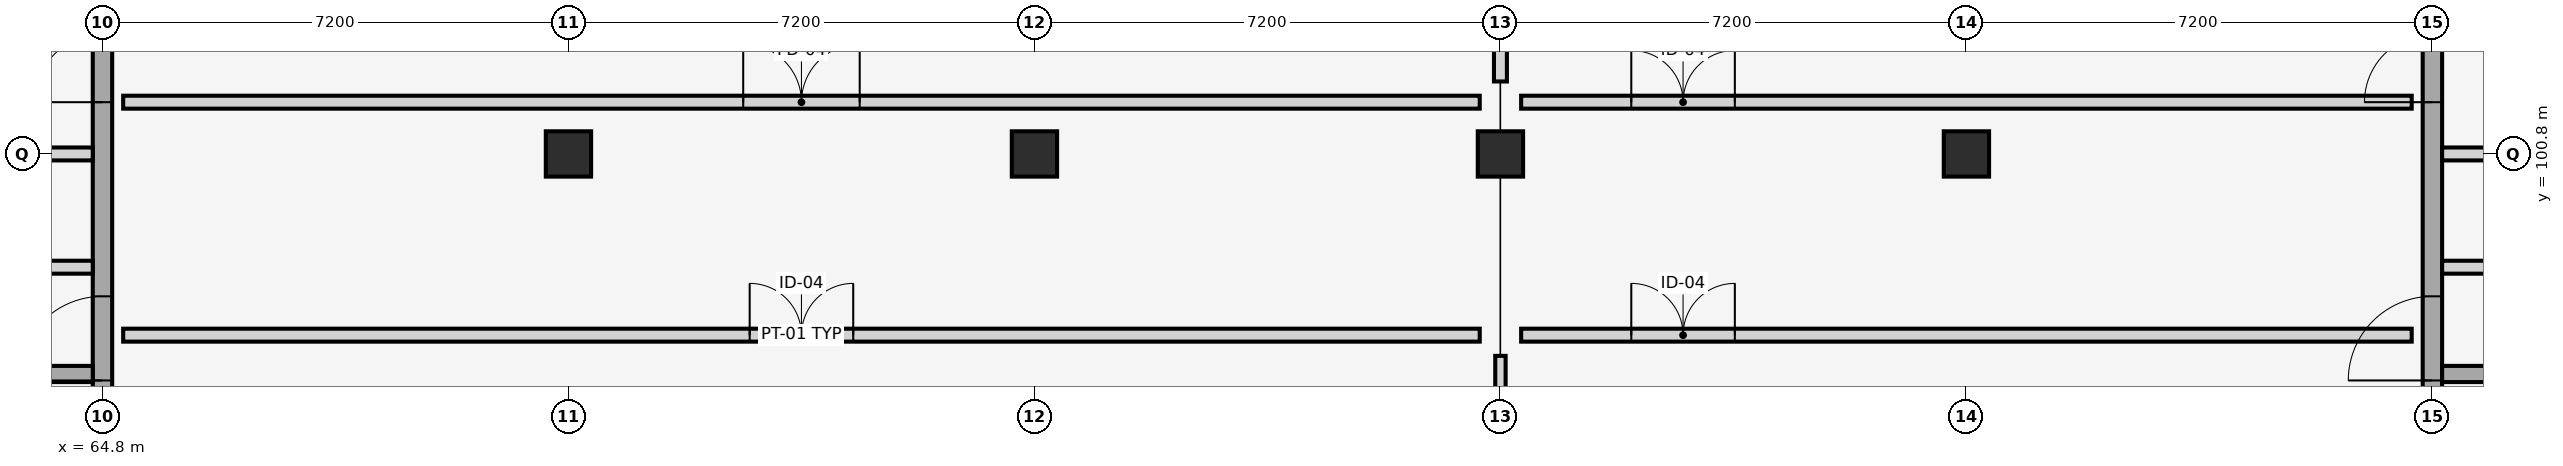
"""IFC4 building model, lengths in metres.
Left out: names, types, materials, properties, quantities, classifications, styles, units other than length and angle.
Written with IfcOpenShell. Run it as: python <this file> out.ifc"""

import sys

from ifc_helpers import new_model, si_unit, direction, frame, frame_2d, origin, origin_2d, place, context, subcontext, project, spatial, rectangle, extrude, element, fill, save


model = new_model("IFC4")
c1 = context("Model", 3, precision=1e-05, world=origin(), true_north=direction((0.0, 1.0)))
c2 = subcontext(c1, "Body", "Model", "MODEL_VIEW")
j1 = project(units=[si_unit("LENGTHUNIT", "METRE"), si_unit("PLANEANGLEUNIT", "RADIAN")], contexts=[c1])
p1 = place(None, origin())
s1 = spatial("IfcSite", under=j1, at=p1, CompositionType="ELEMENT")
p2 = place(p1, origin())
s2 = spatial("IfcBuilding", under=s1, at=p2, CompositionType="ELEMENT")
p3 = place(p2, frame((0.0, 0.0, -4.5)))
s3 = spatial("IfcBuildingStorey", under=s2, at=p3, CompositionType="ELEMENT", Elevation=-4.5)
for number, where, z_axis, x_axis in (
    (1, (72.0, 100.8, -0.45), (0.0, 0.0, 1.0), (1.0, 0.0, 0.0)),
    (2, (79.2, 100.8, -0.45), (0.0, 0.0, 1.0), (0.0, 1.0, 0.0)),
    (3, (86.4, 100.8, -0.45), (0.0, 0.0, 1.0), (1.0, 0.0, 0.0)),
    (4, (93.6, 100.8, -0.45), (0.0, 0.0, 1.0), (0.0, 1.0, 0.0)),
):
    element("IfcColumn", number, at=place(p3, frame(where, z_axis=z_axis, x_axis=x_axis)), inside=s3, PredefinedType="COLUMN", context=c2, shape_type="SweptSolid", body=[
        extrude(rectangle(XDim=0.7, YDim=0.7, at=origin_2d()), origin(), (0.0, 0.0, 1.0), 4.95),
    ])
p4 = place(p3, frame((64.8, 93.75, 0.0), z_axis=(0.0, 0.0, 1.0), x_axis=(0.0, 1.0, 0.0)))
e5 = element("IfcWall", 5, at=p4, inside=s3, PredefinedType="SHEAR", context=c2, shape_type="SweptSolid", body=[
    extrude(rectangle(XDim=14.1, YDim=0.3, at=frame_2d((7.05, 0.0))), origin(), (0.0, 0.0, 1.0), 4.25),
])
p5 = place(p4, frame((3.55, 0.0, 0.0)))
e6 = element("IfcOpeningElement", 6, at=p5, cuts=e5, PredefinedType="OPENING", context=c2, shape_type="SweptSolid", body=[
    extrude(rectangle(XDim=1.3, YDim=2.2, at=frame_2d((0.65, 1.1))), frame((0.0, 0.16, 0.0), z_axis=(0.0, -1.0, 0.0), x_axis=(1.0, 0.0, 0.0)), (0.0, 0.0, 1.0), 0.32),
])
p6 = place(p4, frame((7.85, 0.0, 0.0)))
e7 = element("IfcOpeningElement", 7, at=p6, cuts=e5, PredefinedType="OPENING", context=c2, shape_type="SweptSolid", body=[
    extrude(rectangle(XDim=1.05, YDim=2.15, at=frame_2d((0.525, 1.075))), frame((0.0, 0.16, 0.0), z_axis=(0.0, -1.0, 0.0), x_axis=(1.0, 0.0, 0.0)), (0.0, 0.0, 1.0), 0.32),
])
p7 = place(p4, frame((10.55, 0.0, 0.0)))
e8 = element("IfcOpeningElement", 8, at=p7, cuts=e5, PredefinedType="OPENING", context=c2, shape_type="SweptSolid", body=[
    extrude(rectangle(XDim=1.0, YDim=2.15, at=frame_2d((0.5, 1.075))), frame((0.0, 0.16, 0.0), z_axis=(0.0, -1.0, 0.0), x_axis=(1.0, 0.0, 0.0)), (0.0, 0.0, 1.0), 0.32),
])
p8 = place(p3, frame((61.1, 99.05, 0.0), z_axis=(0.0, 0.0, 1.0), x_axis=(1.0, 0.0, 0.0)))
e9 = element("IfcWall", 9, at=p8, inside=s3, PredefinedType="PLUMBINGWALL", context=c2, shape_type="SweptSolid", body=[
    extrude(rectangle(XDim=3.55, YDim=0.2, at=frame_2d((1.775, 0.0))), origin(), (0.0, 0.0, 1.0), 3.67),
])
p9 = place(p8, frame((0.9, 0.0, 0.0)))
e10 = element("IfcOpeningElement", 10, at=p9, cuts=e9, PredefinedType="OPENING", context=c2, shape_type="SweptSolid", body=[
    extrude(rectangle(XDim=0.85, YDim=2.05, at=frame_2d((0.425, 1.025))), frame((0.0, 0.11, 0.0), z_axis=(0.0, -1.0, 0.0), x_axis=(1.0, 0.0, 0.0)), (0.0, 0.0, 1.0), 0.22),
])
p10 = place(p3, frame((61.275, 97.4, 0.0), z_axis=(0.0, 0.0, 1.0), x_axis=(1.0, 0.0, 0.0)))
e11 = element("IfcWall", 11, at=p10, inside=s3, PredefinedType="SHEAR", context=c2, shape_type="SweptSolid", body=[
    extrude(rectangle(XDim=3.375, YDim=0.25, at=frame_2d((1.688, 0.0))), origin(), (0.0, 0.0, 1.0), 4.25),
])
p11 = place(p3, frame((61.1, 100.8, 0.0), z_axis=(0.0, 0.0, 1.0), x_axis=(1.0, 0.0, 0.0)))
e12 = element("IfcWall", 12, at=p11, inside=s3, PredefinedType="PLUMBINGWALL", context=c2, shape_type="SweptSolid", body=[
    extrude(rectangle(XDim=3.55, YDim=0.2, at=frame_2d((1.775, 0.0))), origin(), (0.0, 0.0, 1.0), 3.67),
])
p12 = place(p3, frame((100.8, 93.75, 0.0), z_axis=(0.0, 0.0, 1.0), x_axis=(0.0, 1.0, 0.0)))
e13 = element("IfcWall", 13, at=p12, inside=s3, PredefinedType="SHEAR", context=c2, shape_type="SweptSolid", body=[
    extrude(rectangle(XDim=14.1, YDim=0.3, at=frame_2d((7.05, 0.0))), origin(), (0.0, 0.0, 1.0), 4.25),
])
p13 = place(p12, frame((3.55, 0.0, 0.0)))
e14 = element("IfcOpeningElement", 14, at=p13, cuts=e13, PredefinedType="OPENING", context=c2, shape_type="SweptSolid", body=[
    extrude(rectangle(XDim=1.3, YDim=2.2, at=frame_2d((0.65, 1.1))), frame((0.0, 0.16, 0.0), z_axis=(0.0, -1.0, 0.0), x_axis=(1.0, 0.0, 0.0)), (0.0, 0.0, 1.0), 0.32),
])
p14 = place(p12, frame((7.85, 0.0, 0.0)))
e15 = element("IfcOpeningElement", 15, at=p14, cuts=e13, PredefinedType="OPENING", context=c2, shape_type="SweptSolid", body=[
    extrude(rectangle(XDim=1.05, YDim=2.15, at=frame_2d((0.525, 1.075))), frame((0.0, 0.16, 0.0), z_axis=(0.0, -1.0, 0.0), x_axis=(1.0, 0.0, 0.0)), (0.0, 0.0, 1.0), 0.32),
])
p15 = place(p12, frame((10.55, 0.0, 0.0)))
e16 = element("IfcOpeningElement", 16, at=p15, cuts=e13, PredefinedType="OPENING", context=c2, shape_type="SweptSolid", body=[
    extrude(rectangle(XDim=1.0, YDim=2.15, at=frame_2d((0.5, 1.075))), frame((0.0, 0.16, 0.0), z_axis=(0.0, -1.0, 0.0), x_axis=(1.0, 0.0, 0.0)), (0.0, 0.0, 1.0), 0.32),
])
p16 = place(p3, frame((100.95, 99.05, 0.0), z_axis=(0.0, 0.0, 1.0), x_axis=(1.0, 0.0, 0.0)))
e17 = element("IfcWall", 17, at=p16, inside=s3, PredefinedType="PLUMBINGWALL", context=c2, shape_type="SweptSolid", body=[
    extrude(rectangle(XDim=3.55, YDim=0.2, at=frame_2d((1.775, 0.0))), origin(), (0.0, 0.0, 1.0), 3.67),
])
p17 = place(p16, frame((0.9, 0.0, 0.0)))
e18 = element("IfcOpeningElement", 18, at=p17, cuts=e17, PredefinedType="OPENING", context=c2, shape_type="SweptSolid", body=[
    extrude(rectangle(XDim=0.85, YDim=2.05, at=frame_2d((0.425, 1.025))), frame((0.0, 0.11, 0.0), z_axis=(0.0, -1.0, 0.0), x_axis=(1.0, 0.0, 0.0)), (0.0, 0.0, 1.0), 0.22),
])
p18 = place(p3, frame((100.95, 97.4, 0.0), z_axis=(0.0, 0.0, 1.0), x_axis=(1.0, 0.0, 0.0)))
e19 = element("IfcWall", 19, at=p18, inside=s3, PredefinedType="SHEAR", context=c2, shape_type="SweptSolid", body=[
    extrude(rectangle(XDim=3.375, YDim=0.25, at=frame_2d((1.688, 0.0))), origin(), (0.0, 0.0, 1.0), 4.25),
])
p19 = place(p3, frame((100.95, 100.8, 0.0), z_axis=(0.0, 0.0, 1.0), x_axis=(1.0, 0.0, 0.0)))
e20 = element("IfcWall", 20, at=p19, inside=s3, PredefinedType="PLUMBINGWALL", context=c2, shape_type="SweptSolid", body=[
    extrude(rectangle(XDim=3.55, YDim=0.2, at=frame_2d((1.775, 0.0))), origin(), (0.0, 0.0, 1.0), 3.67),
])
p20 = place(p3, frame((65.12, 98.0, 0.0), z_axis=(0.0, 0.0, 1.0), x_axis=(1.0, 0.0, 0.0)))
e21 = element("IfcWall", 21, at=p20, inside=s3, PredefinedType="PARTITIONING", context=c2, shape_type="SweptSolid", body=[
    extrude(rectangle(XDim=20.96, YDim=0.2, at=frame_2d((10.48, 0.0))), origin(), (0.0, 0.0, 1.0), 3.45),
])
p21 = place(p20, frame((9.68, 0.0, 0.0)))
e22 = element("IfcOpeningElement", 22, at=p21, cuts=e21, PredefinedType="OPENING", context=c2, shape_type="SweptSolid", body=[
    extrude(rectangle(XDim=1.6, YDim=2.35, at=frame_2d((0.8, 1.175))), frame((0.0, 0.11, 0.0), z_axis=(0.0, -1.0, 0.0), x_axis=(1.0, 0.0, 0.0)), (0.0, 0.0, 1.0), 0.22),
])
p22 = place(p3, frame((86.72, 98.0, 0.0), z_axis=(0.0, 0.0, 1.0), x_axis=(1.0, 0.0, 0.0)))
e23 = element("IfcWall", 23, at=p22, inside=s3, PredefinedType="PARTITIONING", context=c2, shape_type="SweptSolid", body=[
    extrude(rectangle(XDim=13.76, YDim=0.2, at=frame_2d((6.88, 0.0))), origin(), (0.0, 0.0, 1.0), 3.45),
])
p23 = place(p22, frame((1.702, 0.0, 0.0)))
e24 = element("IfcOpeningElement", 24, at=p23, cuts=e23, PredefinedType="OPENING", context=c2, shape_type="SweptSolid", body=[
    extrude(rectangle(XDim=1.6, YDim=2.35, at=frame_2d((0.8, 1.175))), frame((0.0, 0.11, 0.0), z_axis=(0.0, -1.0, 0.0), x_axis=(1.0, 0.0, 0.0)), (0.0, 0.0, 1.0), 0.22),
])
p24 = place(p3, frame((65.12, 101.6, 0.0), z_axis=(0.0, 0.0, 1.0), x_axis=(1.0, 0.0, 0.0)))
e25 = element("IfcWall", 25, at=p24, inside=s3, PredefinedType="PARTITIONING", context=c2, shape_type="SweptSolid", body=[
    extrude(rectangle(XDim=20.96, YDim=0.2, at=frame_2d((10.48, 0.0))), origin(), (0.0, 0.0, 1.0), 3.45),
])
p25 = place(p24, frame((9.58, 0.0, 0.0)))
e26 = element("IfcOpeningElement", 26, at=p25, cuts=e25, PredefinedType="OPENING", context=c2, shape_type="SweptSolid", body=[
    extrude(rectangle(XDim=1.8, YDim=2.4, at=frame_2d((0.9, 1.2))), frame((0.0, 0.11, 0.0), z_axis=(0.0, -1.0, 0.0), x_axis=(1.0, 0.0, 0.0)), (0.0, 0.0, 1.0), 0.22),
])
p26 = place(p3, frame((86.72, 101.6, 0.0), z_axis=(0.0, 0.0, 1.0), x_axis=(1.0, 0.0, 0.0)))
e27 = element("IfcWall", 27, at=p26, inside=s3, PredefinedType="PARTITIONING", context=c2, shape_type="SweptSolid", body=[
    extrude(rectangle(XDim=13.76, YDim=0.2, at=frame_2d((6.88, 0.0))), origin(), (0.0, 0.0, 1.0), 3.45),
])
p27 = place(p26, frame((1.702, 0.0, 0.0)))
e28 = element("IfcOpeningElement", 28, at=p27, cuts=e27, PredefinedType="OPENING", context=c2, shape_type="SweptSolid", body=[
    extrude(rectangle(XDim=1.6, YDim=2.35, at=frame_2d((0.8, 1.175))), frame((0.0, 0.11, 0.0), z_axis=(0.0, -1.0, 0.0), x_axis=(1.0, 0.0, 0.0)), (0.0, 0.0, 1.0), 0.22),
])
p28 = place(p3, frame((86.4, 86.72, 0.0), z_axis=(0.0, 0.0, 1.0), x_axis=(0.0, 1.0, 0.0)))
e29 = element("IfcWall", 29, at=p28, inside=s3, PredefinedType="PARTITIONING", context=c2, shape_type="SweptSolid", body=[
    extrude(rectangle(XDim=10.96, YDim=0.16, at=frame_2d((5.48, 0.0))), origin(), (0.0, 0.0, 1.0), 3.45),
])
p29 = place(p28, frame((1.861, 0.0, 0.0)))
e30 = element("IfcOpeningElement", 30, at=p29, cuts=e29, PredefinedType="OPENING", context=c2, shape_type="SweptSolid", body=[
    extrude(rectangle(XDim=1.15, YDim=2.2, at=frame_2d((0.575, 1.1))), frame((0.0, 0.09, 0.0), z_axis=(0.0, -1.0, 0.0), x_axis=(1.0, 0.0, 0.0)), (0.0, 0.0, 1.0), 0.18),
])
p30 = place(p3, frame((86.4, 101.92, 0.0), z_axis=(0.0, 0.0, 1.0), x_axis=(0.0, 1.0, 0.0)))
e31 = element("IfcWall", 31, at=p30, inside=s3, PredefinedType="PARTITIONING", context=c2, shape_type="SweptSolid", body=[
    extrude(rectangle(XDim=12.96, YDim=0.2, at=frame_2d((6.48, 0.0))), origin(), (0.0, 0.0, 1.0), 3.45),
])
p31 = place(p30, frame((1.692, 0.0, 0.0)))
e32 = element("IfcOpeningElement", 32, at=p31, cuts=e31, PredefinedType="OPENING", context=c2, shape_type="SweptSolid", body=[
    extrude(rectangle(XDim=1.8, YDim=2.4, at=frame_2d((0.9, 1.2))), frame((0.0, 0.11, 0.0), z_axis=(0.0, -1.0, 0.0), x_axis=(1.0, 0.0, 0.0)), (0.0, 0.0, 1.0), 0.22),
])
p32 = place(p5, origin())
e33 = element("IfcDoor", 33, at=p32, inside=s3, OperationType="SINGLE_SWING_LEFT", PredefinedType="DOOR", context=c2, shape_type="SweptSolid", body=[
    extrude(rectangle(XDim=1.3, YDim=2.2, at=frame_2d((0.65, 1.1))), frame((0.0, 0.025, 0.0), z_axis=(0.0, -1.0, 0.0), x_axis=(1.0, 0.0, 0.0)), (0.0, 0.0, 1.0), 0.05),
])
fill(e6, e33)
p33 = place(p6, origin())
e34 = element("IfcDoor", 34, at=p33, inside=s3, OperationType="SINGLE_SWING_LEFT", PredefinedType="DOOR", context=c2, shape_type="SweptSolid", body=[
    extrude(rectangle(XDim=1.05, YDim=2.15, at=frame_2d((0.525, 1.075))), frame((0.0, 0.025, 0.0), z_axis=(0.0, -1.0, 0.0), x_axis=(1.0, 0.0, 0.0)), (0.0, 0.0, 1.0), 0.05),
])
fill(e7, e34)
p34 = place(p13, origin())
e35 = element("IfcDoor", 35, at=p34, inside=s3, OperationType="SINGLE_SWING_LEFT", PredefinedType="DOOR", context=c2, shape_type="SweptSolid", body=[
    extrude(rectangle(XDim=1.3, YDim=2.2, at=frame_2d((0.65, 1.1))), frame((0.0, 0.025, 0.0), z_axis=(0.0, -1.0, 0.0), x_axis=(1.0, 0.0, 0.0)), (0.0, 0.0, 1.0), 0.05),
])
fill(e14, e35)
p35 = place(p14, origin())
e36 = element("IfcDoor", 36, at=p35, inside=s3, OperationType="SINGLE_SWING_LEFT", PredefinedType="DOOR", context=c2, shape_type="SweptSolid", body=[
    extrude(rectangle(XDim=1.05, YDim=2.15, at=frame_2d((0.525, 1.075))), frame((0.0, 0.025, 0.0), z_axis=(0.0, -1.0, 0.0), x_axis=(1.0, 0.0, 0.0)), (0.0, 0.0, 1.0), 0.05),
])
fill(e15, e36)
p36 = place(p21, origin())
e37 = element("IfcDoor", 37, at=p36, inside=s3, OperationType="DOUBLE_DOOR_SINGLE_SWING", PredefinedType="DOOR", context=c2, shape_type="SweptSolid", body=[
    extrude(rectangle(XDim=1.6, YDim=2.35, at=frame_2d((0.8, 1.175))), frame((0.0, 0.025, 0.0), z_axis=(0.0, -1.0, 0.0), x_axis=(1.0, 0.0, 0.0)), (0.0, 0.0, 1.0), 0.05),
])
fill(e22, e37)
p37 = place(p23, origin())
e38 = element("IfcDoor", 38, at=p37, inside=s3, OperationType="DOUBLE_DOOR_SINGLE_SWING", PredefinedType="DOOR", context=c2, shape_type="SweptSolid", body=[
    extrude(rectangle(XDim=1.6, YDim=2.35, at=frame_2d((0.8, 1.175))), frame((0.0, 0.025, 0.0), z_axis=(0.0, -1.0, 0.0), x_axis=(1.0, 0.0, 0.0)), (0.0, 0.0, 1.0), 0.05),
])
fill(e24, e38)
p38 = place(p25, origin())
e39 = element("IfcDoor", 39, at=p38, inside=s3, OperationType="DOUBLE_DOOR_SINGLE_SWING", PredefinedType="DOOR", context=c2, shape_type="SweptSolid", body=[
    extrude(rectangle(XDim=1.8, YDim=2.4, at=frame_2d((0.9, 1.2))), frame((0.0, 0.025, 0.0), z_axis=(0.0, -1.0, 0.0), x_axis=(1.0, 0.0, 0.0)), (0.0, 0.0, 1.0), 0.05),
])
fill(e26, e39)
p39 = place(p27, origin())
e40 = element("IfcDoor", 40, at=p39, inside=s3, OperationType="DOUBLE_DOOR_SINGLE_SWING", PredefinedType="DOOR", context=c2, shape_type="SweptSolid", body=[
    extrude(rectangle(XDim=1.6, YDim=2.35, at=frame_2d((0.8, 1.175))), frame((0.0, 0.025, 0.0), z_axis=(0.0, -1.0, 0.0), x_axis=(1.0, 0.0, 0.0)), (0.0, 0.0, 1.0), 0.05),
])
fill(e28, e40)
save(model, sys.argv[1])
